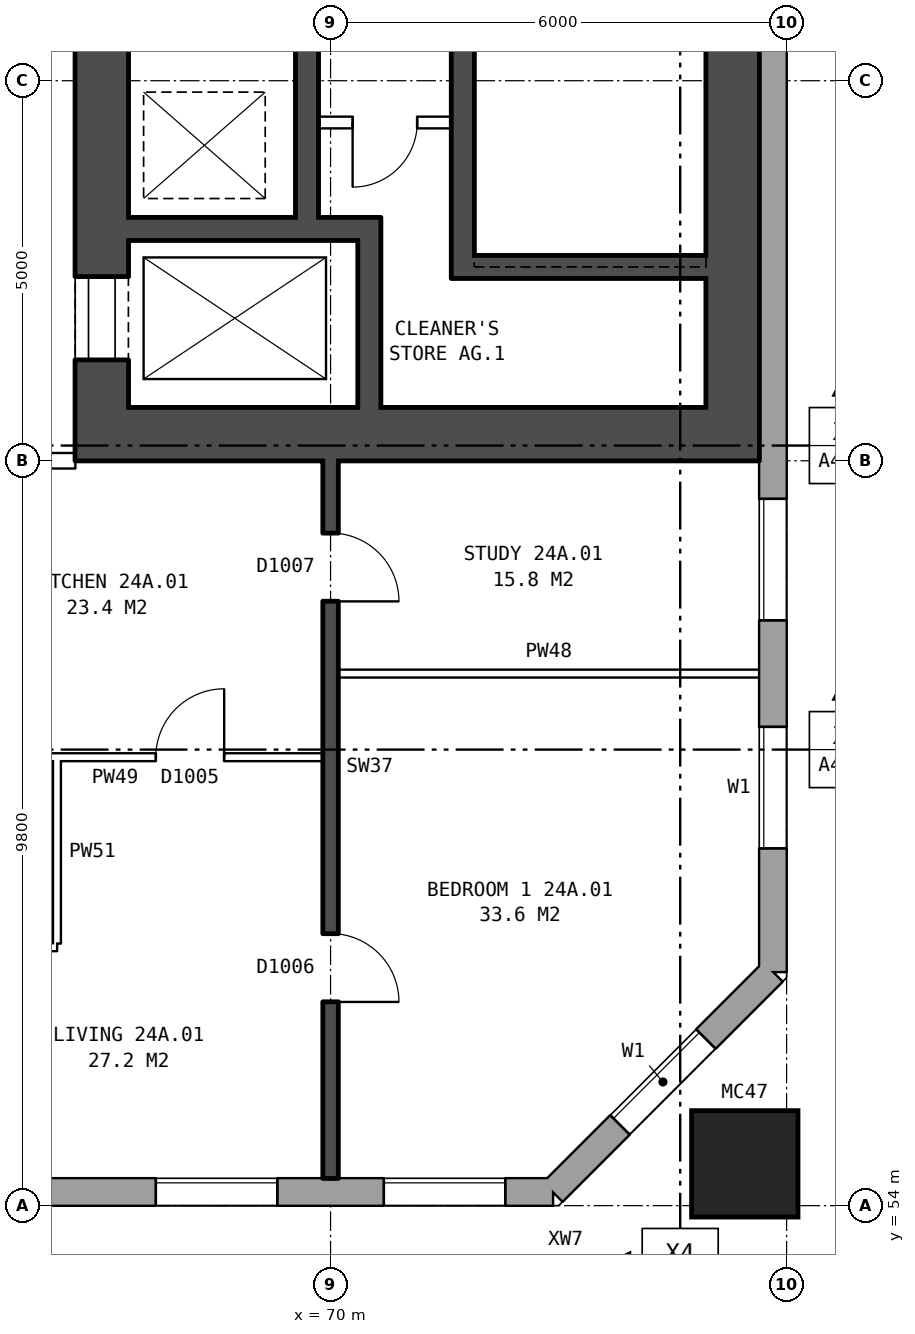
"""IFC4 building model, lengths in metres.
Left out: names, types, materials, properties, quantities, classifications, styles, units other than length and angle.
Written with IfcOpenShell. Run it as: python <this file> out.ifc"""

import sys

from ifc_helpers import new_model, si_unit, direction, frame, frame_2d, origin, origin_2d, place, context, subcontext, project, spatial, rectangle, hollow_rectangle, extrude, element, fill, save


model = new_model("IFC4")
c1 = context("Model", 3, precision=1e-05, world=origin(), true_north=direction((0.0, 1.0)))
c2 = subcontext(c1, "Body", "Model", "MODEL_VIEW")
j1 = project(units=[si_unit("LENGTHUNIT", "METRE"), si_unit("PLANEANGLEUNIT", "RADIAN")], contexts=[c1])
p1 = place(None, origin())
s1 = spatial("IfcSite", under=j1, at=p1, CompositionType="ELEMENT")
p2 = place(p1, origin())
s2 = spatial("IfcBuilding", under=s1, at=p2, CompositionType="ELEMENT")
p3 = place(p2, frame((0.0, 0.0, 87.1)))
s3 = spatial("IfcBuildingStorey", under=s2, at=p3, CompositionType="ELEMENT", Elevation=87.1)
p4 = place(p3, frame((75.45, 54.55, 0.0), z_axis=(0.0, 0.0, 1.0), x_axis=(1.0, 0.0, 0.0)))
e1 = element("IfcColumn", 1, at=p4, inside=s3, PredefinedType="COLUMN", context=c2, shape_type="SweptSolid", body=[
    extrude(hollow_rectangle(XDim=1.4, YDim=1.4, WallThickness=0.075, at=origin_2d()), origin(), (0.0, 0.0, 1.0), 3.1),
])
p5 = place(p3, frame((26.325, 54.18, 0.0), z_axis=(0.0, 0.0, 1.0), x_axis=(1.0, 0.0, 0.0)))
e2 = element("IfcWall", 2, at=p5, inside=s3, PredefinedType="STANDARD", context=c2, shape_type="SweptSolid", body=[
    extrude(rectangle(XDim=46.601, YDim=0.36, at=frame_2d((23.3, 0.0))), origin(), (0.0, 0.0, 1.0), 2.85),
])
p6 = place(p5, frame((2.375, 0.0, 0.8)))
e3 = element("IfcOpeningElement", 3, at=p6, cuts=e2, PredefinedType="OPENING", context=c2, shape_type="SweptSolid", body=[
    extrude(rectangle(XDim=1.6, YDim=1.8, at=frame_2d((0.8, 0.9))), frame((0.0, 0.19, 0.0), z_axis=(0.0, -1.0, 0.0), x_axis=(1.0, 0.0, 0.0)), (0.0, 0.0, 1.0), 0.38),
])
p7 = place(p5, frame((5.375, 0.0, 0.8)))
e4 = element("IfcOpeningElement", 4, at=p7, cuts=e2, PredefinedType="OPENING", context=c2, shape_type="SweptSolid", body=[
    extrude(rectangle(XDim=1.6, YDim=1.8, at=frame_2d((0.8, 0.9))), frame((0.0, 0.19, 0.0), z_axis=(0.0, -1.0, 0.0), x_axis=(1.0, 0.0, 0.0)), (0.0, 0.0, 1.0), 0.38),
])
p8 = place(p5, frame((8.375, 0.0, 0.8)))
e5 = element("IfcOpeningElement", 5, at=p8, cuts=e2, PredefinedType="OPENING", context=c2, shape_type="SweptSolid", body=[
    extrude(rectangle(XDim=1.6, YDim=1.8, at=frame_2d((0.8, 0.9))), frame((0.0, 0.19, 0.0), z_axis=(0.0, -1.0, 0.0), x_axis=(1.0, 0.0, 0.0)), (0.0, 0.0, 1.0), 0.38),
])
p9 = place(p5, frame((11.375, 0.0, 0.8)))
e6 = element("IfcOpeningElement", 6, at=p9, cuts=e2, PredefinedType="OPENING", context=c2, shape_type="SweptSolid", body=[
    extrude(rectangle(XDim=1.6, YDim=1.8, at=frame_2d((0.8, 0.9))), frame((0.0, 0.19, 0.0), z_axis=(0.0, -1.0, 0.0), x_axis=(1.0, 0.0, 0.0)), (0.0, 0.0, 1.0), 0.38),
])
p10 = place(p5, frame((14.375, 0.0, 0.8)))
e7 = element("IfcOpeningElement", 7, at=p10, cuts=e2, PredefinedType="OPENING", context=c2, shape_type="SweptSolid", body=[
    extrude(rectangle(XDim=1.6, YDim=1.8, at=frame_2d((0.8, 0.9))), frame((0.0, 0.19, 0.0), z_axis=(0.0, -1.0, 0.0), x_axis=(1.0, 0.0, 0.0)), (0.0, 0.0, 1.0), 0.38),
])
p11 = place(p5, frame((17.375, 0.0, 0.8)))
e8 = element("IfcOpeningElement", 8, at=p11, cuts=e2, PredefinedType="OPENING", context=c2, shape_type="SweptSolid", body=[
    extrude(rectangle(XDim=1.6, YDim=1.8, at=frame_2d((0.8, 0.9))), frame((0.0, 0.19, 0.0), z_axis=(0.0, -1.0, 0.0), x_axis=(1.0, 0.0, 0.0)), (0.0, 0.0, 1.0), 0.38),
])
p12 = place(p5, frame((19.875, 0.0, 1.4)))
e9 = element("IfcOpeningElement", 9, at=p12, cuts=e2, PredefinedType="OPENING", context=c2, shape_type="SweptSolid", body=[
    extrude(rectangle(XDim=1.2, YDim=1.2, at=frame_2d((0.6, 0.6))), frame((0.0, 0.19, 0.0), z_axis=(0.0, -1.0, 0.0), x_axis=(1.0, 0.0, 0.0)), (0.0, 0.0, 1.0), 0.38),
])
p13 = place(p5, frame((22.825, 0.0, 0.25)))
e10 = element("IfcOpeningElement", 10, at=p13, cuts=e2, PredefinedType="OPENING", context=c2, shape_type="SweptSolid", body=[
    extrude(rectangle(XDim=0.8, YDim=1.5, at=frame_2d((0.4, 0.75))), frame((0.0, 0.19, 0.0), z_axis=(0.0, -1.0, 0.0), x_axis=(1.0, 0.0, 0.0)), (0.0, 0.0, 1.0), 0.38),
])
p14 = place(p5, frame((26.375, 0.0, 0.8)))
e11 = element("IfcOpeningElement", 11, at=p14, cuts=e2, PredefinedType="OPENING", context=c2, shape_type="SweptSolid", body=[
    extrude(rectangle(XDim=1.6, YDim=1.8, at=frame_2d((0.8, 0.9))), frame((0.0, 0.19, 0.0), z_axis=(0.0, -1.0, 0.0), x_axis=(1.0, 0.0, 0.0)), (0.0, 0.0, 1.0), 0.38),
])
p15 = place(p5, frame((29.375, 0.0, 0.8)))
e12 = element("IfcOpeningElement", 12, at=p15, cuts=e2, PredefinedType="OPENING", context=c2, shape_type="SweptSolid", body=[
    extrude(rectangle(XDim=1.6, YDim=1.8, at=frame_2d((0.8, 0.9))), frame((0.0, 0.19, 0.0), z_axis=(0.0, -1.0, 0.0), x_axis=(1.0, 0.0, 0.0)), (0.0, 0.0, 1.0), 0.38),
])
p16 = place(p5, frame((32.375, 0.0, 0.8)))
e13 = element("IfcOpeningElement", 13, at=p16, cuts=e2, PredefinedType="OPENING", context=c2, shape_type="SweptSolid", body=[
    extrude(rectangle(XDim=1.6, YDim=1.8, at=frame_2d((0.8, 0.9))), frame((0.0, 0.19, 0.0), z_axis=(0.0, -1.0, 0.0), x_axis=(1.0, 0.0, 0.0)), (0.0, 0.0, 1.0), 0.38),
])
p17 = place(p5, frame((35.375, 0.0, 0.8)))
e14 = element("IfcOpeningElement", 14, at=p17, cuts=e2, PredefinedType="OPENING", context=c2, shape_type="SweptSolid", body=[
    extrude(rectangle(XDim=1.6, YDim=1.8, at=frame_2d((0.8, 0.9))), frame((0.0, 0.19, 0.0), z_axis=(0.0, -1.0, 0.0), x_axis=(1.0, 0.0, 0.0)), (0.0, 0.0, 1.0), 0.38),
])
p18 = place(p5, frame((38.375, 0.0, 0.8)))
e15 = element("IfcOpeningElement", 15, at=p18, cuts=e2, PredefinedType="OPENING", context=c2, shape_type="SweptSolid", body=[
    extrude(rectangle(XDim=1.6, YDim=1.8, at=frame_2d((0.8, 0.9))), frame((0.0, 0.19, 0.0), z_axis=(0.0, -1.0, 0.0), x_axis=(1.0, 0.0, 0.0)), (0.0, 0.0, 1.0), 0.38),
])
p19 = place(p5, frame((41.375, 0.0, 0.8)))
e16 = element("IfcOpeningElement", 16, at=p19, cuts=e2, PredefinedType="OPENING", context=c2, shape_type="SweptSolid", body=[
    extrude(rectangle(XDim=1.6, YDim=1.8, at=frame_2d((0.8, 0.9))), frame((0.0, 0.19, 0.0), z_axis=(0.0, -1.0, 0.0), x_axis=(1.0, 0.0, 0.0)), (0.0, 0.0, 1.0), 0.38),
])
p20 = place(p5, frame((44.375, 0.0, 0.8)))
e17 = element("IfcOpeningElement", 17, at=p20, cuts=e2, PredefinedType="OPENING", context=c2, shape_type="SweptSolid", body=[
    extrude(rectangle(XDim=1.6, YDim=1.8, at=frame_2d((0.8, 0.9))), frame((0.0, 0.19, 0.0), z_axis=(0.0, -1.0, 0.0), x_axis=(1.0, 0.0, 0.0)), (0.0, 0.0, 1.0), 0.38),
])
p21 = place(p5, frame((23.925, 0.0, 0.15)))
e18 = element("IfcOpeningElement", 18, at=p21, cuts=e2, PredefinedType="OPENING", context=c2, shape_type="SweptSolid", body=[
    extrude(rectangle(XDim=0.6, YDim=0.9, at=frame_2d((0.3, 0.45))), frame((0.0, 0.19, 0.0), z_axis=(0.0, -1.0, 0.0), x_axis=(1.0, 0.0, 0.0)), (0.0, 0.0, 1.0), 0.38),
])
p22 = place(p3, frame((72.925, 54.18, 0.0), z_axis=(0.0, 0.0, 1.0), x_axis=(0.707106781187, 0.707106781187, 0.0)))
e19 = element("IfcWall", 19, at=p22, inside=s3, PredefinedType="STANDARD", context=c2, shape_type="SweptSolid", body=[
    extrude(rectangle(XDim=4.094, YDim=0.36, at=frame_2d((2.047, 0.0))), origin(), (0.0, 0.0, 1.0), 2.85),
])
p23 = place(p22, frame((1.247, 0.0, 0.8)))
e20 = element("IfcOpeningElement", 20, at=p23, cuts=e19, PredefinedType="OPENING", context=c2, shape_type="SweptSolid", body=[
    extrude(rectangle(XDim=1.6, YDim=1.8, at=frame_2d((0.8, 0.9))), frame((0.0, 0.19, 0.0), z_axis=(0.0, -1.0, 0.0), x_axis=(1.0, 0.0, 0.0)), (0.0, 0.0, 1.0), 0.38),
])
p24 = place(p3, frame((75.82, 57.075, 0.0), z_axis=(0.0, 0.0, 1.0), x_axis=(0.0, 1.0, 0.0)))
e21 = element("IfcWall", 21, at=p24, inside=s3, PredefinedType="STANDARD", context=c2, shape_type="SweptSolid", body=[
    extrude(rectangle(XDim=25.851, YDim=0.36, at=frame_2d((12.925, 0.0))), origin(), (0.0, 0.0, 1.0), 2.85),
])
p25 = place(p24, frame((1.625, 0.0, 0.8)))
e22 = element("IfcOpeningElement", 22, at=p25, cuts=e21, PredefinedType="OPENING", context=c2, shape_type="SweptSolid", body=[
    extrude(rectangle(XDim=1.6, YDim=1.8, at=frame_2d((0.8, 0.9))), frame((0.0, 0.19, 0.0), z_axis=(0.0, -1.0, 0.0), x_axis=(1.0, 0.0, 0.0)), (0.0, 0.0, 1.0), 0.38),
])
p26 = place(p24, frame((4.625, 0.0, 0.8)))
e23 = element("IfcOpeningElement", 23, at=p26, cuts=e21, PredefinedType="OPENING", context=c2, shape_type="SweptSolid", body=[
    extrude(rectangle(XDim=1.6, YDim=1.8, at=frame_2d((0.8, 0.9))), frame((0.0, 0.19, 0.0), z_axis=(0.0, -1.0, 0.0), x_axis=(1.0, 0.0, 0.0)), (0.0, 0.0, 1.0), 0.38),
])
p27 = place(p24, frame((19.625, 0.0, 0.8)))
e24 = element("IfcOpeningElement", 24, at=p27, cuts=e21, PredefinedType="OPENING", context=c2, shape_type="SweptSolid", body=[
    extrude(rectangle(XDim=1.6, YDim=1.8, at=frame_2d((0.8, 0.9))), frame((0.0, 0.19, 0.0), z_axis=(0.0, -1.0, 0.0), x_axis=(1.0, 0.0, 0.0)), (0.0, 0.0, 1.0), 0.38),
])
p28 = place(p24, frame((22.625, 0.0, 0.8)))
e25 = element("IfcOpeningElement", 25, at=p28, cuts=e21, PredefinedType="OPENING", context=c2, shape_type="SweptSolid", body=[
    extrude(rectangle(XDim=1.6, YDim=1.8, at=frame_2d((0.8, 0.9))), frame((0.0, 0.19, 0.0), z_axis=(0.0, -1.0, 0.0), x_axis=(1.0, 0.0, 0.0)), (0.0, 0.0, 1.0), 0.38),
])
p29 = place(p3, frame((66.99, 64.5, 0.0), z_axis=(0.0, 0.0, 1.0), x_axis=(0.0, 1.0, 0.0)))
e26 = element("IfcWall", 26, at=p29, inside=s3, PredefinedType="SHEAR", context=c2, shape_type="SweptSolid", body=[
    extrude(rectangle(XDim=11.0, YDim=0.7, at=frame_2d((5.5, 0.0))), origin(), (0.0, 0.0, 1.0), 2.85),
])
p30 = place(p29, frame((0.625, 0.0, 0.0)))
e27 = element("IfcOpeningElement", 27, at=p30, cuts=e26, PredefinedType="OPENING", context=c2, shape_type="SweptSolid", body=[
    extrude(rectangle(XDim=1.1, YDim=2.1, at=frame_2d((0.55, 1.05))), frame((0.0, 0.36, 0.0), z_axis=(0.0, -1.0, 0.0), x_axis=(1.0, 0.0, 0.0)), (0.0, 0.0, 1.0), 0.72),
])
p31 = place(p29, frame((9.2, 0.0, 0.0)))
e28 = element("IfcOpeningElement", 28, at=p31, cuts=e26, PredefinedType="OPENING", context=c2, shape_type="SweptSolid", body=[
    extrude(rectangle(XDim=1.1, YDim=2.1, at=frame_2d((0.55, 1.05))), frame((0.0, 0.36, 0.0), z_axis=(0.0, -1.0, 0.0), x_axis=(1.0, 0.0, 0.0)), (0.0, 0.0, 1.0), 0.72),
])
p32 = place(p3, frame((75.29, 64.5, 0.0), z_axis=(0.0, 0.0, 1.0), x_axis=(0.0, 1.0, 0.0)))
e29 = element("IfcWall", 29, at=p32, inside=s3, PredefinedType="SHEAR", context=c2, shape_type="SweptSolid", body=[
    extrude(rectangle(XDim=11.0, YDim=0.7, at=frame_2d((5.5, 0.0))), origin(), (0.0, 0.0, 1.0), 2.85),
])
p33 = place(p3, frame((66.64, 64.15, 0.0), z_axis=(0.0, 0.0, 1.0), x_axis=(1.0, 0.0, 0.0)))
e30 = element("IfcWall", 30, at=p33, inside=s3, PredefinedType="SHEAR", context=c2, shape_type="SweptSolid", body=[
    extrude(rectangle(XDim=9.0, YDim=0.7, at=frame_2d((4.5, 0.0))), origin(), (0.0, 0.0, 1.0), 2.85),
])
p34 = place(p3, frame((71.89, 66.35, 0.0), z_axis=(0.0, 0.0, 1.0), x_axis=(1.0, 0.0, 0.0)))
e31 = element("IfcWall", 31, at=p34, inside=s3, PredefinedType="SHEAR", context=c2, shape_type="SweptSolid", body=[
    extrude(rectangle(XDim=3.05, YDim=0.3, at=frame_2d((1.525, 0.0))), origin(), (0.0, 0.0, 1.0), 2.85),
])
p35 = place(p3, frame((67.34, 66.85, 0.0), z_axis=(0.0, 0.0, 1.0), x_axis=(1.0, 0.0, 0.0)))
e32 = element("IfcWall", 32, at=p35, inside=s3, PredefinedType="SHEAR", context=c2, shape_type="SweptSolid", body=[
    extrude(rectangle(XDim=3.32, YDim=0.3, at=frame_2d((1.66, 0.0))), origin(), (0.0, 0.0, 1.0), 2.85),
])
p36 = place(p3, frame((69.84, 68.25, 0.0), z_axis=(0.0, 0.0, 1.0), x_axis=(1.0, 0.0, 0.0)))
e33 = element("IfcWall", 33, at=p36, inside=s3, PredefinedType="PARTITIONING", context=c2, shape_type="SweptSolid", body=[
    extrude(rectangle(XDim=1.75, YDim=0.15, at=frame_2d((0.875, 0.0))), origin(), (0.0, 0.0, 1.0), 2.85),
])
p37 = place(p36, frame((0.45, 0.0, 0.0)))
e34 = element("IfcOpeningElement", 34, at=p37, cuts=e33, PredefinedType="OPENING", context=c2, shape_type="SweptSolid", body=[
    extrude(rectangle(XDim=0.85, YDim=2.1, at=frame_2d((0.425, 1.05))), frame((0.0, 0.085, 0.0), z_axis=(0.0, -1.0, 0.0), x_axis=(1.0, 0.0, 0.0)), (0.0, 0.0, 1.0), 0.17),
])
p38 = place(p3, frame((69.69, 67.0, 0.0), z_axis=(0.0, 0.0, 1.0), x_axis=(0.0, 1.0, 0.0)))
e35 = element("IfcWall", 35, at=p38, inside=s3, PredefinedType="SHEAR", context=c2, shape_type="SweptSolid", body=[
    extrude(rectangle(XDim=6.6, YDim=0.3, at=frame_2d((3.3, 0.0))), origin(), (0.0, 0.0, 1.0), 2.85),
])
p39 = place(p3, frame((70.51, 64.5, 0.0), z_axis=(0.0, 0.0, 1.0), x_axis=(0.0, 1.0, 0.0)))
e36 = element("IfcWall", 36, at=p39, inside=s3, PredefinedType="SHEAR", context=c2, shape_type="SweptSolid", body=[
    extrude(rectangle(XDim=2.2, YDim=0.3, at=frame_2d((1.1, 0.0))), origin(), (0.0, 0.0, 1.0), 2.85),
])
p40 = place(p3, frame((71.74, 66.2, 0.0), z_axis=(0.0, 0.0, 1.0), x_axis=(0.0, 1.0, 0.0)))
e37 = element("IfcWall", 37, at=p40, inside=s3, PredefinedType="SHEAR", context=c2, shape_type="SweptSolid", body=[
    extrude(rectangle(XDim=7.4, YDim=0.3, at=frame_2d((3.7, 0.0))), origin(), (0.0, 0.0, 1.0), 2.85),
])
p41 = place(p3, frame((64.1, 57.4, 0.0), z_axis=(0.0, 0.0, 1.0), x_axis=(1.0, 0.0, 0.0)))
e38 = element("IfcWall", 38, at=p41, inside=s3, PredefinedType="PARTITIONING", context=c2, shape_type="SweptSolid", body=[
    extrude(rectangle(XDim=2.3, YDim=0.1, at=frame_2d((1.15, 0.0))), origin(), (0.0, 0.0, 1.0), 2.85),
])
p42 = place(p3, frame((64.1, 59.9, 0.0), z_axis=(0.0, 0.0, 1.0), x_axis=(1.0, 0.0, 0.0)))
e39 = element("IfcWall", 39, at=p42, inside=s3, PredefinedType="PARTITIONING", context=c2, shape_type="SweptSolid", body=[
    extrude(rectangle(XDim=5.8, YDim=0.1, at=frame_2d((2.9, 0.0))), origin(), (0.0, 0.0, 1.0), 2.85),
])
p43 = place(p42, frame((3.6, 0.0, 0.0)))
e40 = element("IfcOpeningElement", 40, at=p43, cuts=e39, PredefinedType="OPENING", context=c2, shape_type="SweptSolid", body=[
    extrude(rectangle(XDim=0.9, YDim=2.1, at=frame_2d((0.45, 1.05))), frame((0.0, 0.06, 0.0), z_axis=(0.0, -1.0, 0.0), x_axis=(1.0, 0.0, 0.0)), (0.0, 0.0, 1.0), 0.12),
])
p44 = place(p42, frame((0.7, 0.0, 0.0)))
e41 = element("IfcOpeningElement", 41, at=p44, cuts=e39, PredefinedType="OPENING", context=c2, shape_type="SweptSolid", body=[
    extrude(rectangle(XDim=0.9, YDim=2.1, at=frame_2d((0.45, 1.05))), frame((0.0, 0.06, 0.0), z_axis=(0.0, -1.0, 0.0), x_axis=(1.0, 0.0, 0.0)), (0.0, 0.0, 1.0), 0.12),
])
p45 = place(p3, frame((70.1, 61.0, 0.0), z_axis=(0.0, 0.0, 1.0), x_axis=(1.0, 0.0, 0.0)))
e42 = element("IfcWall", 42, at=p45, inside=s3, PredefinedType="PARTITIONING", context=c2, shape_type="SweptSolid", body=[
    extrude(rectangle(XDim=5.54, YDim=0.1, at=frame_2d((2.77, 0.0))), origin(), (0.0, 0.0, 1.0), 2.85),
])
p46 = place(p3, frame((63.64, 63.8, 0.0), z_axis=(0.0, 0.0, 1.0), x_axis=(1.0, 0.0, 0.0)))
e43 = element("IfcWall", 43, at=p46, inside=s3, PredefinedType="PARTITIONING", context=c2, shape_type="SweptSolid", body=[
    extrude(rectangle(XDim=3.0, YDim=0.2, at=frame_2d((1.5, 0.0))), origin(), (0.0, 0.0, 1.0), 2.85),
])
p47 = place(p46, frame((1.18, 0.0, 0.0)))
e44 = element("IfcOpeningElement", 44, at=p47, cuts=e43, PredefinedType="OPENING", context=c2, shape_type="SweptSolid", body=[
    extrude(rectangle(XDim=1.0, YDim=2.1, at=frame_2d((0.5, 1.05))), frame((0.0, 0.11, 0.0), z_axis=(0.0, -1.0, 0.0), x_axis=(1.0, 0.0, 0.0)), (0.0, 0.0, 1.0), 0.22),
])
p48 = place(p3, frame((66.4, 57.45, 0.0), z_axis=(0.0, 0.0, 1.0), x_axis=(0.0, 1.0, 0.0)))
e45 = element("IfcWall", 45, at=p48, inside=s3, PredefinedType="PARTITIONING", context=c2, shape_type="SweptSolid", body=[
    extrude(rectangle(XDim=2.4, YDim=0.1, at=frame_2d((1.2, 0.0))), origin(), (0.0, 0.0, 1.0), 2.85),
])
p49 = place(p3, frame((70.0, 54.36, 0.0), z_axis=(0.0, 0.0, 1.0), x_axis=(0.0, 1.0, 0.0)))
e46 = element("IfcWall", 46, at=p49, inside=s3, PredefinedType="SOLIDWALL", context=c2, shape_type="SweptSolid", body=[
    extrude(rectangle(XDim=9.44, YDim=0.2, at=frame_2d((4.72, 0.0))), origin(), (0.0, 0.0, 1.0), 2.85),
])
p50 = place(p49, frame((2.32, 0.0, 0.0)))
e47 = element("IfcOpeningElement", 47, at=p50, cuts=e46, PredefinedType="OPENING", context=c2, shape_type="SweptSolid", body=[
    extrude(rectangle(XDim=0.9, YDim=2.1, at=frame_2d((0.45, 1.05))), frame((0.0, 0.11, 0.0), z_axis=(0.0, -1.0, 0.0), x_axis=(1.0, 0.0, 0.0)), (0.0, 0.0, 1.0), 0.22),
])
p51 = place(p49, frame((7.59, 0.0, 0.0)))
e48 = element("IfcOpeningElement", 48, at=p51, cuts=e46, PredefinedType="OPENING", context=c2, shape_type="SweptSolid", body=[
    extrude(rectangle(XDim=0.9, YDim=2.1, at=frame_2d((0.45, 1.05))), frame((0.0, 0.11, 0.0), z_axis=(0.0, -1.0, 0.0), x_axis=(1.0, 0.0, 0.0)), (0.0, 0.0, 1.0), 0.22),
])
p52 = place(p19, origin())
e49 = element("IfcWindow", 49, at=p52, inside=s3, PartitioningType="SINGLE_PANEL", PredefinedType="WINDOW", context=c2, shape_type="SweptSolid", body=[
    extrude(rectangle(XDim=1.6, YDim=1.8, at=frame_2d((0.8, 0.9))), frame((0.0, 0.15, 0.0), z_axis=(0.0, -1.0, 0.0), x_axis=(1.0, 0.0, 0.0)), (0.0, 0.0, 1.0), 0.06),
])
fill(e16, e49)
p53 = place(p20, origin())
e50 = element("IfcWindow", 50, at=p53, inside=s3, PartitioningType="SINGLE_PANEL", PredefinedType="WINDOW", context=c2, shape_type="SweptSolid", body=[
    extrude(rectangle(XDim=1.6, YDim=1.8, at=frame_2d((0.8, 0.9))), frame((0.0, 0.15, 0.0), z_axis=(0.0, -1.0, 0.0), x_axis=(1.0, 0.0, 0.0)), (0.0, 0.0, 1.0), 0.06),
])
fill(e17, e50)
p54 = place(p23, origin())
e51 = element("IfcWindow", 51, at=p54, inside=s3, PartitioningType="SINGLE_PANEL", PredefinedType="WINDOW", context=c2, shape_type="SweptSolid", body=[
    extrude(rectangle(XDim=1.6, YDim=1.8, at=frame_2d((0.8, 0.9))), frame((0.0, 0.15, 0.0), z_axis=(0.0, -1.0, 0.0), x_axis=(1.0, 0.0, 0.0)), (0.0, 0.0, 1.0), 0.06),
])
fill(e20, e51)
p55 = place(p25, origin())
e52 = element("IfcWindow", 52, at=p55, inside=s3, PartitioningType="SINGLE_PANEL", PredefinedType="WINDOW", context=c2, shape_type="SweptSolid", body=[
    extrude(rectangle(XDim=1.6, YDim=1.8, at=frame_2d((0.8, 0.9))), frame((0.0, 0.15, 0.0), z_axis=(0.0, -1.0, 0.0), x_axis=(1.0, 0.0, 0.0)), (0.0, 0.0, 1.0), 0.06),
])
fill(e22, e52)
p56 = place(p26, origin())
e53 = element("IfcWindow", 53, at=p56, inside=s3, PartitioningType="SINGLE_PANEL", PredefinedType="WINDOW", context=c2, shape_type="SweptSolid", body=[
    extrude(rectangle(XDim=1.6, YDim=1.8, at=frame_2d((0.8, 0.9))), frame((0.0, 0.15, 0.0), z_axis=(0.0, -1.0, 0.0), x_axis=(1.0, 0.0, 0.0)), (0.0, 0.0, 1.0), 0.06),
])
fill(e23, e53)
p57 = place(p30, origin())
e54 = element("IfcDoor", 54, at=p57, inside=s3, OperationType="DOUBLE_DOOR_SLIDING", PredefinedType="DOOR", context=c2, shape_type="SweptSolid", body=[
    extrude(rectangle(XDim=1.1, YDim=2.1, at=frame_2d((0.55, 1.05))), frame((0.0, -0.285, 0.0), z_axis=(0.0, -1.0, 0.0), x_axis=(1.0, 0.0, 0.0)), (0.0, 0.0, 1.0), 0.05),
])
fill(e27, e54)
p58 = place(p37, frame((0.85, 0.0, 0.0), z_axis=(0.0, 0.0, 1.0), x_axis=(-1.0, 0.0, 0.0)))
e55 = element("IfcDoor", 55, at=p58, inside=s3, OperationType="SINGLE_SWING_RIGHT", PredefinedType="DOOR", context=c2, shape_type="SweptSolid", body=[
    extrude(rectangle(XDim=0.85, YDim=2.1, at=frame_2d((0.425, 1.05))), frame((0.0, 0.025, 0.0), z_axis=(0.0, -1.0, 0.0), x_axis=(1.0, 0.0, 0.0)), (0.0, 0.0, 1.0), 0.05),
])
fill(e34, e55)
p59 = place(p50, frame((0.9, 0.0, 0.0), z_axis=(0.0, 0.0, 1.0), x_axis=(-1.0, 0.0, 0.0)))
e56 = element("IfcDoor", 56, at=p59, inside=s3, OperationType="SINGLE_SWING_RIGHT", PredefinedType="DOOR", context=c2, shape_type="SweptSolid", body=[
    extrude(rectangle(XDim=0.9, YDim=2.1, at=frame_2d((0.45, 1.05))), frame((0.0, 0.025, 0.0), z_axis=(0.0, -1.0, 0.0), x_axis=(1.0, 0.0, 0.0)), (0.0, 0.0, 1.0), 0.05),
])
fill(e47, e56)
p60 = place(p51, frame((0.9, 0.0, 0.0), z_axis=(0.0, 0.0, 1.0), x_axis=(-1.0, 0.0, 0.0)))
e57 = element("IfcDoor", 57, at=p60, inside=s3, OperationType="SINGLE_SWING_RIGHT", PredefinedType="DOOR", context=c2, shape_type="SweptSolid", body=[
    extrude(rectangle(XDim=0.9, YDim=2.1, at=frame_2d((0.45, 1.05))), frame((0.0, 0.025, 0.0), z_axis=(0.0, -1.0, 0.0), x_axis=(1.0, 0.0, 0.0)), (0.0, 0.0, 1.0), 0.05),
])
fill(e48, e57)
p61 = place(p43, origin())
e58 = element("IfcDoor", 58, at=p61, inside=s3, OperationType="SINGLE_SWING_RIGHT", PredefinedType="DOOR", context=c2, shape_type="SweptSolid", body=[
    extrude(rectangle(XDim=0.9, YDim=2.1, at=frame_2d((0.45, 1.05))), frame((0.0, 0.025, 0.0), z_axis=(0.0, -1.0, 0.0), x_axis=(1.0, 0.0, 0.0)), (0.0, 0.0, 1.0), 0.05),
])
fill(e40, e58)
save(model, sys.argv[1])
